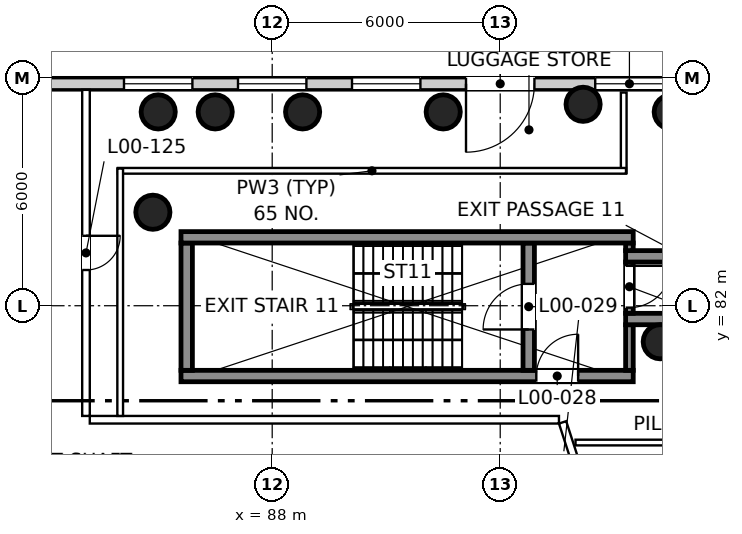
"""IFC4 building model, lengths in metres.
Left out: names, types, materials, properties, quantities, classifications, styles, units other than length and angle.
Written with IfcOpenShell. Run it as: python <this file> out.ifc"""

import sys

from ifc_helpers import new_model, si_unit, direction, frame, frame_2d, origin, origin_2d, place, context, subcontext, project, spatial, rectangle, circle, extrude, element, fill, save


model = new_model("IFC4")
c1 = context("Model", 3, precision=1e-05, world=origin(), true_north=direction((0.0, 1.0)))
c2 = subcontext(c1, "Body", "Model", "MODEL_VIEW")
j1 = project(units=[si_unit("LENGTHUNIT", "METRE"), si_unit("PLANEANGLEUNIT", "RADIAN")], contexts=[c1])
p1 = place(None, origin())
s1 = spatial("IfcSite", under=j1, at=p1, CompositionType="ELEMENT")
p2 = place(p1, origin())
s2 = spatial("IfcBuilding", under=s1, at=p2, CompositionType="ELEMENT")
p3 = place(p2, origin())
s3 = spatial("IfcBuildingStorey", under=s2, at=p3, CompositionType="ELEMENT", Elevation=0.0)
for number, where, z_axis, x_axis in (
    (1, (84.86, 84.46, 0.0), (0.0, 0.0, 1.0), (1.0, 0.0, 0.0)),
    (2, (98.5, 87.1, 0.0), (0.0, 0.0, 1.0), (1.0, 0.0, 0.0)),
    (3, (92.5, 87.1, 0.0), (0.0, 0.0, 1.0), (1.0, 0.0, 0.0)),
    (4, (86.5, 87.1, 0.0), (0.0, 0.0, 1.0), (1.0, 0.0, 0.0)),
    (5, (98.211, 81.052, 0.0), (0.0, 0.0, 1.0), (1.0, 0.0, 0.0)),
    (6, (96.181, 87.3, 0.0), (0.0, 0.0, 1.0), (1.0, 0.0, 0.0)),
    (7, (88.8, 87.1, 0.0), (0.0, 0.0, 1.0), (1.0, 0.0, 0.0)),
    (8, (85.0, 87.1, 0.0), (0.0, 0.0, 1.0), (1.0, 0.0, 0.0)),
):
    element("IfcColumn", number, at=place(p3, frame(where, z_axis=z_axis, x_axis=x_axis)), inside=s3, PredefinedType="COLUMN", context=c2, shape_type="SweptSolid", body=[
        extrude(circle(Radius=0.45, at=origin_2d()), origin(), (0.0, 0.0, 1.0), 9.0),
    ])
p4 = place(p3, frame((101.891, 87.84, 0.0), z_axis=(0.0, 0.0, 1.0), x_axis=(-1.0, 0.0, 0.0)))
e9 = element("IfcWall", 9, at=p4, inside=s3, PredefinedType="SOLIDWALL", context=c2, shape_type="SweptSolid", body=[
    extrude(rectangle(XDim=20.891, YDim=0.32, at=frame_2d((10.446, 0.0))), origin(), (0.0, 0.0, 1.0), 8.65),
])
p5 = place(p4, frame((3.591, 0.0, 0.9)))
e10 = element("IfcOpeningElement", 10, at=p5, cuts=e9, PredefinedType="OPENING", context=c2, shape_type="SweptSolid", body=[
    extrude(rectangle(XDim=1.8, YDim=2.1, at=frame_2d((0.9, 1.05))), frame((0.0, 0.17, 0.0), z_axis=(0.0, -1.0, 0.0), x_axis=(1.0, 0.0, 0.0)), (0.0, 0.0, 1.0), 0.34),
])
p6 = place(p4, frame((6.991, 0.0, 0.0)))
e11 = element("IfcOpeningElement", 11, at=p6, cuts=e9, PredefinedType="OPENING", context=c2, shape_type="SweptSolid", body=[
    extrude(rectangle(XDim=1.8, YDim=2.7, at=frame_2d((0.9, 1.35))), frame((0.0, 0.17, 0.0), z_axis=(0.0, -1.0, 0.0), x_axis=(1.0, 0.0, 0.0)), (0.0, 0.0, 1.0), 0.34),
])
p7 = place(p4, frame((9.991, 0.0, 0.9)))
e12 = element("IfcOpeningElement", 12, at=p7, cuts=e9, PredefinedType="OPENING", context=c2, shape_type="SweptSolid", body=[
    extrude(rectangle(XDim=1.8, YDim=2.1, at=frame_2d((0.9, 1.05))), frame((0.0, 0.17, 0.0), z_axis=(0.0, -1.0, 0.0), x_axis=(1.0, 0.0, 0.0)), (0.0, 0.0, 1.0), 0.34),
])
p8 = place(p4, frame((12.991, 0.0, 0.9)))
e13 = element("IfcOpeningElement", 13, at=p8, cuts=e9, PredefinedType="OPENING", context=c2, shape_type="SweptSolid", body=[
    extrude(rectangle(XDim=1.8, YDim=2.1, at=frame_2d((0.9, 1.05))), frame((0.0, 0.17, 0.0), z_axis=(0.0, -1.0, 0.0), x_axis=(1.0, 0.0, 0.0)), (0.0, 0.0, 1.0), 0.34),
])
p9 = place(p4, frame((15.991, 0.0, 0.9)))
e14 = element("IfcOpeningElement", 14, at=p9, cuts=e9, PredefinedType="OPENING", context=c2, shape_type="SweptSolid", body=[
    extrude(rectangle(XDim=1.8, YDim=2.1, at=frame_2d((0.9, 1.05))), frame((0.0, 0.17, 0.0), z_axis=(0.0, -1.0, 0.0), x_axis=(1.0, 0.0, 0.0)), (0.0, 0.0, 1.0), 0.34),
])
p10 = place(p4, frame((1.291, 0.0, 0.0)))
e15 = element("IfcOpeningElement", 15, at=p10, cuts=e9, PredefinedType="OPENING", context=c2, shape_type="SweptSolid", body=[
    extrude(rectangle(XDim=1.2, YDim=2.1, at=frame_2d((0.6, 1.05))), frame((0.0, 0.17, 0.0), z_axis=(0.0, -1.0, 0.0), x_axis=(1.0, 0.0, 0.0)), (0.0, 0.0, 1.0), 0.34),
])
p11 = place(p3, frame((85.6, 80.15, 0.0), z_axis=(0.0, 0.0, 1.0), x_axis=(1.0, 0.0, 0.0)))
e16 = element("IfcWall", 16, at=p11, inside=s3, PredefinedType="SHEAR", context=c2, shape_type="SweptSolid", body=[
    extrude(rectangle(XDim=11.9, YDim=0.3, at=frame_2d((5.95, 0.0))), origin(), (0.0, 0.0, 1.0), 9.0),
])
p12 = place(p11, frame((9.35, 0.0, 0.0)))
e17 = element("IfcOpeningElement", 17, at=p12, cuts=e16, PredefinedType="OPENING", context=c2, shape_type="SweptSolid", body=[
    extrude(rectangle(XDim=1.1, YDim=2.1, at=frame_2d((0.55, 1.05))), frame((0.0, 0.16, 0.0), z_axis=(0.0, -1.0, 0.0), x_axis=(1.0, 0.0, 0.0)), (0.0, 0.0, 1.0), 0.32),
])
p13 = place(p3, frame((85.75, 80.3, 0.0), z_axis=(0.0, 0.0, 1.0), x_axis=(0.0, 1.0, 0.0)))
e18 = element("IfcWall", 18, at=p13, inside=s3, PredefinedType="SHEAR", context=c2, shape_type="SweptSolid", body=[
    extrude(rectangle(XDim=3.35, YDim=0.3, at=frame_2d((1.675, 0.0))), origin(), (0.0, 0.0, 1.0), 9.0),
])
p14 = place(p3, frame((94.75, 80.3, 0.0), z_axis=(0.0, 0.0, 1.0), x_axis=(0.0, 1.0, 0.0)))
e19 = element("IfcWall", 19, at=p14, inside=s3, PredefinedType="SHEAR", context=c2, shape_type="SweptSolid", body=[
    extrude(rectangle(XDim=3.35, YDim=0.3, at=frame_2d((1.675, 0.0))), origin(), (0.0, 0.0, 1.0), 9.0),
])
p15 = place(p14, frame((1.075, 0.0, 0.0)))
e20 = element("IfcOpeningElement", 20, at=p15, cuts=e19, PredefinedType="OPENING", context=c2, shape_type="SweptSolid", body=[
    extrude(rectangle(XDim=1.2, YDim=2.1, at=frame_2d((0.6, 1.05))), frame((0.0, 0.16, 0.0), z_axis=(0.0, -1.0, 0.0), x_axis=(1.0, 0.0, 0.0)), (0.0, 0.0, 1.0), 0.32),
])
p16 = place(p3, frame((97.4, 80.3, 0.0), z_axis=(0.0, 0.0, 1.0), x_axis=(0.0, 1.0, 0.0)))
e21 = element("IfcWall", 21, at=p16, inside=s3, PredefinedType="SHEAR", context=c2, shape_type="SweptSolid", body=[
    extrude(rectangle(XDim=1.2, YDim=0.2, at=frame_2d((0.6, 0.0))), origin(), (0.0, 0.0, 1.0), 9.0),
])
p17 = place(p3, frame((97.3, 81.65, 0.0), z_axis=(0.0, 0.0, 1.0), x_axis=(1.0, 0.0, 0.0)))
e22 = element("IfcWall", 22, at=p17, inside=s3, PredefinedType="SHEAR", context=c2, shape_type="SweptSolid", body=[
    extrude(rectangle(XDim=3.85, YDim=0.3, at=frame_2d((1.925, 0.0))), origin(), (0.0, 0.0, 1.0), 9.0),
])
p18 = place(p3, frame((97.4, 81.8, 0.0), z_axis=(0.0, 0.0, 1.0), x_axis=(0.0, 1.0, 0.0)))
e23 = element("IfcWall", 23, at=p18, inside=s3, PredefinedType="SHEAR", context=c2, shape_type="SweptSolid", body=[
    extrude(rectangle(XDim=1.35, YDim=0.2, at=frame_2d((0.675, 0.0))), origin(), (0.0, 0.0, 1.0), 9.0),
])
p19 = place(p18, frame((0.15, 0.0, 0.0)))
e24 = element("IfcOpeningElement", 24, at=p19, cuts=e23, PredefinedType="OPENING", context=c2, shape_type="SweptSolid", body=[
    extrude(rectangle(XDim=1.1, YDim=2.1, at=frame_2d((0.55, 1.05))), frame((0.0, 0.11, 0.0), z_axis=(0.0, -1.0, 0.0), x_axis=(1.0, 0.0, 0.0)), (0.0, 0.0, 1.0), 0.22),
])
p20 = place(p3, frame((97.3, 83.3, 0.0), z_axis=(0.0, 0.0, 1.0), x_axis=(1.0, 0.0, 0.0)))
e25 = element("IfcWall", 25, at=p20, inside=s3, PredefinedType="SHEAR", context=c2, shape_type="SweptSolid", body=[
    extrude(rectangle(XDim=1.85, YDim=0.3, at=frame_2d((0.925, 0.0))), origin(), (0.0, 0.0, 1.0), 9.0),
])
p21 = place(p3, frame((97.3, 83.55, 0.0), z_axis=(0.0, 0.0, 1.0), x_axis=(1.0, 0.0, 0.0)))
e26 = element("IfcWall", 26, at=p21, inside=s3, PredefinedType="SHEAR", context=c2, shape_type="SweptSolid", body=[
    extrude(rectangle(XDim=0.2, YDim=0.2, at=frame_2d((0.1, 0.0))), origin(), (0.0, 0.0, 1.0), 9.0),
])
p22 = place(p3, frame((85.6, 83.8, 0.0), z_axis=(0.0, 0.0, 1.0), x_axis=(1.0, 0.0, 0.0)))
e27 = element("IfcWall", 27, at=p22, inside=s3, PredefinedType="SHEAR", context=c2, shape_type="SweptSolid", body=[
    extrude(rectangle(XDim=11.9, YDim=0.3, at=frame_2d((5.95, 0.0))), origin(), (0.0, 0.0, 1.0), 9.0),
])
p23 = place(p3, frame((83.1, 87.68, 0.0), z_axis=(0.0, 0.0, 1.0), x_axis=(0.0, -1.0, 0.0)))
e28 = element("IfcWall", 28, at=p23, inside=s3, PredefinedType="PARTITIONING", context=c2, shape_type="SweptSolid", body=[
    extrude(rectangle(XDim=8.58, YDim=0.2, at=frame_2d((4.29, 0.0))), origin(), (0.0, 0.0, 1.0), 8.65),
])
p24 = place(p23, frame((3.84, 0.0, 0.0)))
e29 = element("IfcOpeningElement", 29, at=p24, cuts=e28, PredefinedType="OPENING", context=c2, shape_type="SweptSolid", body=[
    extrude(rectangle(XDim=0.9, YDim=2.1, at=frame_2d((0.45, 1.05))), frame((0.0, 0.11, 0.0), z_axis=(0.0, -1.0, 0.0), x_axis=(1.0, 0.0, 0.0)), (0.0, 0.0, 1.0), 0.22),
])
p25 = place(p3, frame((83.2, 79.0, 0.0), z_axis=(0.0, 0.0, 1.0), x_axis=(1.0, 0.0, 0.0)))
e30 = element("IfcWall", 30, at=p25, inside=s3, PredefinedType="PARTITIONING", context=c2, shape_type="SweptSolid", body=[
    extrude(rectangle(XDim=12.346, YDim=0.2, at=frame_2d((6.173, 0.0))), origin(), (0.0, 0.0, 1.0), 7.95),
])
p26 = place(p3, frame((95.641, 78.931, 0.0), z_axis=(0.0, 0.0, 1.0), x_axis=(0.309013160516, -0.951057761983, 0.0)))
e31 = element("IfcWall", 31, at=p26, inside=s3, PredefinedType="PARTITIONING", context=c2, shape_type="SweptSolid", body=[
    extrude(rectangle(XDim=17.717, YDim=0.2, at=frame_2d((8.859, 0.0))), origin(), (0.0, 0.0, 1.0), 8.65),
])
p27 = place(p26, frame((13.799, 0.0, 0.0)))
e32 = element("IfcOpeningElement", 32, at=p27, cuts=e31, PredefinedType="OPENING", context=c2, shape_type="SweptSolid", body=[
    extrude(rectangle(XDim=0.9, YDim=2.1, at=frame_2d((0.45, 1.05))), frame((0.0, 0.11, 0.0), z_axis=(0.0, -1.0, 0.0), x_axis=(1.0, 0.0, 0.0)), (0.0, 0.0, 1.0), 0.22),
])
p28 = place(p26, frame((10.375, 0.0, 0.0)))
e33 = element("IfcOpeningElement", 33, at=p28, cuts=e31, PredefinedType="OPENING", context=c2, shape_type="SweptSolid", body=[
    extrude(rectangle(XDim=0.9, YDim=2.1, at=frame_2d((0.45, 1.05))), frame((0.0, 0.11, 0.0), z_axis=(0.0, -1.0, 0.0), x_axis=(1.0, 0.0, 0.0)), (0.0, 0.0, 1.0), 0.22),
])
p29 = place(p26, frame((5.875, 0.0, 0.0)))
e34 = element("IfcOpeningElement", 34, at=p29, cuts=e31, PredefinedType="OPENING", context=c2, shape_type="SweptSolid", body=[
    extrude(rectangle(XDim=0.9, YDim=2.1, at=frame_2d((0.45, 1.05))), frame((0.0, 0.11, 0.0), z_axis=(0.0, -1.0, 0.0), x_axis=(1.0, 0.0, 0.0)), (0.0, 0.0, 1.0), 0.22),
])
p30 = place(p26, frame((1.492, 0.0, 0.0)))
e35 = element("IfcOpeningElement", 35, at=p30, cuts=e31, PredefinedType="OPENING", context=c2, shape_type="SweptSolid", body=[
    extrude(rectangle(XDim=0.9, YDim=2.1, at=frame_2d((0.45, 1.05))), frame((0.0, 0.11, 0.0), z_axis=(0.0, -1.0, 0.0), x_axis=(1.0, 0.0, 0.0)), (0.0, 0.0, 1.0), 0.22),
])
p31 = place(p3, frame((104.924, 78.45, 0.0), z_axis=(0.0, 0.0, 1.0), x_axis=(-0.951054768527, -0.309022373402, 0.0)))
e36 = element("IfcWall", 36, at=p31, inside=s3, PredefinedType="PARTITIONING", context=c2, shape_type="SweptSolid", body=[
    extrude(rectangle(XDim=8.58, YDim=0.15, at=frame_2d((4.29, 0.0))), origin(), (0.0, 0.0, 1.0), 7.95),
])
p32 = place(p3, frame((97.25, 87.61, 0.0), z_axis=(0.0, 0.0, 1.0), x_axis=(0.0, -1.0, 0.0)))
e37 = element("IfcWall", 37, at=p32, inside=s3, PredefinedType="PARTITIONING", context=c2, shape_type="SweptSolid", body=[
    extrude(rectangle(XDim=2.12, YDim=0.15, at=frame_2d((1.06, 0.0))), origin(), (0.0, 0.0, 1.0), 8.65),
])
p33 = place(p3, frame((97.31, 85.55, 0.0), z_axis=(0.0, 0.0, 1.0), x_axis=(-1.0, 0.0, 0.0)))
e38 = element("IfcWall", 38, at=p33, inside=s3, PredefinedType="PARTITIONING", context=c2, shape_type="SweptSolid", body=[
    extrude(rectangle(XDim=13.37, YDim=0.15, at=frame_2d((6.685, 0.0))), origin(), (0.0, 0.0, 1.0), 7.95),
])
p34 = place(p3, frame((84.0, 85.61, 0.0), z_axis=(0.0, 0.0, 1.0), x_axis=(0.0, -1.0, 0.0)))
e39 = element("IfcWall", 39, at=p34, inside=s3, PredefinedType="PARTITIONING", context=c2, shape_type="SweptSolid", body=[
    extrude(rectangle(XDim=6.51, YDim=0.15, at=frame_2d((3.255, 0.0))), origin(), (0.0, 0.0, 1.0), 8.65),
])
p35 = place(p3, frame((95.982, 78.4, 0.0), z_axis=(0.0, 0.0, 1.0), x_axis=(1.0, 0.0, 0.0)))
e40 = element("IfcWall", 40, at=p35, inside=s3, PredefinedType="PARTITIONING", context=c2, shape_type="SweptSolid", body=[
    extrude(rectangle(XDim=3.118, YDim=0.15, at=frame_2d((1.559, 0.0))), origin(), (0.0, 0.0, 1.0), 7.95),
])
p36 = place(p5, origin())
e41 = element("IfcWindow", 41, at=p36, inside=s3, PartitioningType="SINGLE_PANEL", PredefinedType="WINDOW", context=c2, shape_type="SweptSolid", body=[
    extrude(rectangle(XDim=1.8, YDim=2.1, at=frame_2d((0.9, 1.05))), frame((0.0, 0.07, 0.0), z_axis=(0.0, -1.0, 0.0), x_axis=(1.0, 0.0, 0.0)), (0.0, 0.0, 1.0), 0.06),
])
fill(e10, e41)
p37 = place(p6, origin())
e42 = element("IfcDoor", 42, at=p37, inside=s3, OperationType="DOUBLE_DOOR_DOUBLE_SWING", PredefinedType="DOOR", context=c2, shape_type="SweptSolid", body=[
    extrude(rectangle(XDim=1.8, YDim=2.7, at=frame_2d((0.9, 1.35))), frame((0.0, 0.04, 0.0), z_axis=(0.0, -1.0, 0.0), x_axis=(1.0, 0.0, 0.0)), (0.0, 0.0, 1.0), 0.05),
])
fill(e11, e42)
p38 = place(p7, origin())
e43 = element("IfcWindow", 43, at=p38, inside=s3, PartitioningType="SINGLE_PANEL", PredefinedType="WINDOW", context=c2, shape_type="SweptSolid", body=[
    extrude(rectangle(XDim=1.8, YDim=2.1, at=frame_2d((0.9, 1.05))), frame((0.0, 0.07, 0.0), z_axis=(0.0, -1.0, 0.0), x_axis=(1.0, 0.0, 0.0)), (0.0, 0.0, 1.0), 0.06),
])
fill(e12, e43)
p39 = place(p8, origin())
e44 = element("IfcWindow", 44, at=p39, inside=s3, PartitioningType="SINGLE_PANEL", PredefinedType="WINDOW", context=c2, shape_type="SweptSolid", body=[
    extrude(rectangle(XDim=1.8, YDim=2.1, at=frame_2d((0.9, 1.05))), frame((0.0, 0.07, 0.0), z_axis=(0.0, -1.0, 0.0), x_axis=(1.0, 0.0, 0.0)), (0.0, 0.0, 1.0), 0.06),
])
fill(e13, e44)
p40 = place(p9, origin())
e45 = element("IfcWindow", 45, at=p40, inside=s3, PartitioningType="SINGLE_PANEL", PredefinedType="WINDOW", context=c2, shape_type="SweptSolid", body=[
    extrude(rectangle(XDim=1.8, YDim=2.1, at=frame_2d((0.9, 1.05))), frame((0.0, 0.07, 0.0), z_axis=(0.0, -1.0, 0.0), x_axis=(1.0, 0.0, 0.0)), (0.0, 0.0, 1.0), 0.06),
])
fill(e14, e45)
p41 = place(p12, origin())
e46 = element("IfcDoor", 46, at=p41, inside=s3, OperationType="SINGLE_SWING_RIGHT", PredefinedType="DOOR", context=c2, shape_type="SweptSolid", body=[
    extrude(rectangle(XDim=1.1, YDim=2.1, at=frame_2d((0.55, 1.05))), frame((0.0, 0.025, 0.0), z_axis=(0.0, -1.0, 0.0), x_axis=(1.0, 0.0, 0.0)), (0.0, 0.0, 1.0), 0.05),
])
fill(e17, e46)
p42 = place(p15, origin())
e47 = element("IfcDoor", 47, at=p42, inside=s3, OperationType="SINGLE_SWING_LEFT", PredefinedType="DOOR", context=c2, shape_type="SweptSolid", body=[
    extrude(rectangle(XDim=1.2, YDim=2.1, at=frame_2d((0.6, 1.05))), frame((0.0, 0.025, 0.0), z_axis=(0.0, -1.0, 0.0), x_axis=(1.0, 0.0, 0.0)), (0.0, 0.0, 1.0), 0.05),
])
fill(e20, e47)
p43 = place(p19, frame((1.1, 0.0, 0.0), z_axis=(0.0, 0.0, 1.0), x_axis=(-1.0, 0.0, 0.0)))
e48 = element("IfcDoor", 48, at=p43, inside=s3, OperationType="SINGLE_SWING_LEFT", PredefinedType="DOOR", context=c2, shape_type="SweptSolid", body=[
    extrude(rectangle(XDim=1.1, YDim=2.1, at=frame_2d((0.55, 1.05))), frame((0.0, 0.025, 0.0), z_axis=(0.0, -1.0, 0.0), x_axis=(1.0, 0.0, 0.0)), (0.0, 0.0, 1.0), 0.05),
])
fill(e24, e48)
p44 = place(p24, origin())
e49 = element("IfcDoor", 49, at=p44, inside=s3, OperationType="SINGLE_SWING_LEFT", PredefinedType="DOOR", context=c2, shape_type="SweptSolid", body=[
    extrude(rectangle(XDim=0.9, YDim=2.1, at=frame_2d((0.45, 1.05))), frame((0.0, 0.025, 0.0), z_axis=(0.0, -1.0, 0.0), x_axis=(1.0, 0.0, 0.0)), (0.0, 0.0, 1.0), 0.05),
])
fill(e29, e49)
save(model, sys.argv[1])
